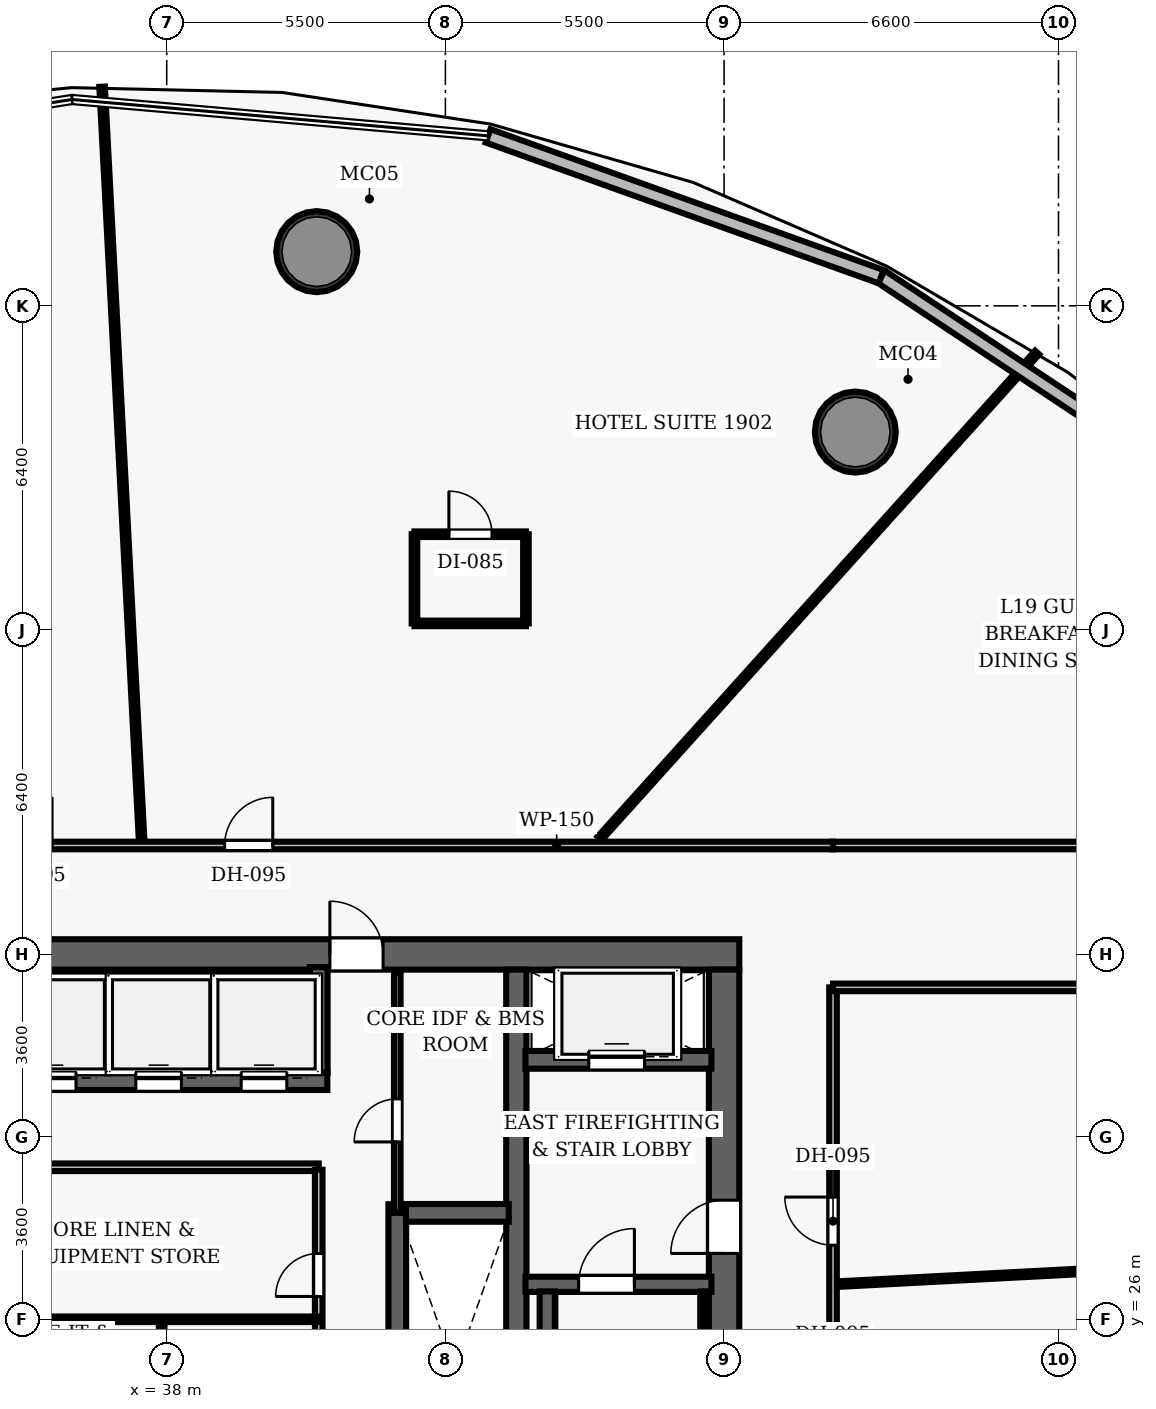
"""IFC4 building model, lengths in metres.
Left out: names, types, materials, properties, quantities, classifications, styles, units other than length and angle.
Written with IfcOpenShell. Run it as: python <this file> out.ifc"""

import sys

from ifc_helpers import new_model, si_unit, direction, frame, frame_2d, origin, origin_2d, place, context, subcontext, project, spatial, rectangle, hollow_circle, extrude, element, fill, save


model = new_model("IFC4")
c1 = context("Model", 3, precision=1e-05, world=origin(), true_north=direction((0.0, 1.0)))
c2 = subcontext(c1, "Body", "Model", "MODEL_VIEW")
j1 = project(units=[si_unit("LENGTHUNIT", "METRE"), si_unit("PLANEANGLEUNIT", "RADIAN")], contexts=[c1])
p1 = place(None, origin())
s1 = spatial("IfcSite", under=j1, at=p1, CompositionType="ELEMENT")
p2 = place(p1, origin())
s2 = spatial("IfcBuilding", under=s1, at=p2, CompositionType="ELEMENT")
p3 = place(p2, frame((0.0, 0.0, 83.4)))
s3 = spatial("IfcBuildingStorey", under=s2, at=p3, CompositionType="ELEMENT", Elevation=83.4)
p4 = place(p3, frame((26.7, 33.2, 0.0), z_axis=(0.0, 0.0, 1.0), x_axis=(1.0, 0.0, 0.0)))
e1 = element("IfcWall", 1, at=p4, inside=s3, PredefinedType="SHEAR", context=c2, shape_type="SweptSolid", body=[
    extrude(rectangle(XDim=22.6, YDim=0.6, at=frame_2d((11.3, 0.0))), origin(), (0.0, 0.0, 1.0), 3.5),
])
p5 = place(p4, frame((4.62, 0.0, 0.0)))
e2 = element("IfcOpeningElement", 2, at=p5, cuts=e1, PredefinedType="OPENING", context=c2, shape_type="SweptSolid", body=[
    extrude(rectangle(XDim=1.05, YDim=2.15, at=frame_2d((0.525, 1.075))), frame((0.0, 0.31, 0.0), z_axis=(0.0, -1.0, 0.0), x_axis=(1.0, 0.0, 0.0)), (0.0, 0.0, 1.0), 0.62),
])
p6 = place(p4, frame((14.52, 0.0, 0.0)))
e3 = element("IfcOpeningElement", 3, at=p6, cuts=e1, PredefinedType="OPENING", context=c2, shape_type="SweptSolid", body=[
    extrude(rectangle(XDim=1.05, YDim=2.15, at=frame_2d((0.525, 1.075))), frame((0.0, 0.31, 0.0), z_axis=(0.0, -1.0, 0.0), x_axis=(1.0, 0.0, 0.0)), (0.0, 0.0, 1.0), 0.62),
])
p7 = place(p3, frame((49.0, 19.1, 0.0), z_axis=(0.0, 0.0, 1.0), x_axis=(0.0, 1.0, 0.0)))
e4 = element("IfcWall", 4, at=p7, inside=s3, PredefinedType="SHEAR", context=c2, shape_type="SweptSolid", body=[
    extrude(rectangle(XDim=13.8, YDim=0.6, at=frame_2d((6.9, 0.0))), origin(), (0.0, 0.0, 1.0), 3.5),
])
p8 = place(p7, frame((8.2, 0.0, 0.0)))
e5 = element("IfcOpeningElement", 5, at=p8, cuts=e4, PredefinedType="OPENING", context=c2, shape_type="SweptSolid", body=[
    extrude(rectangle(XDim=1.05, YDim=2.15, at=frame_2d((0.525, 1.075))), frame((0.0, 0.31, 0.0), z_axis=(0.0, -1.0, 0.0), x_axis=(1.0, 0.0, 0.0)), (0.0, 0.0, 1.0), 0.62),
])
p9 = place(p3, frame((44.9, 19.1, 0.0), z_axis=(0.0, 0.0, 1.0), x_axis=(0.0, 1.0, 0.0)))
e6 = element("IfcWall", 6, at=p9, inside=s3, PredefinedType="SHEAR", context=c2, shape_type="SweptSolid", body=[
    extrude(rectangle(XDim=13.8, YDim=0.4, at=frame_2d((6.9, 0.0))), origin(), (0.0, 0.0, 1.0), 3.5),
])
for number, where, z_axis, x_axis in (
    (7, (51.59, 43.509, 0.0), (0.0, 0.0, 1.0), (1.0, 0.0, 0.0)),
    (8, (40.961, 47.069, 0.0), (0.0, 0.0, 1.0), (1.0, 0.0, 0.0)),
):
    element("IfcColumn", number, at=place(p3, frame(where, z_axis=z_axis, x_axis=x_axis)), inside=s3, PredefinedType="COLUMN", context=c2, shape_type="SweptSolid", body=[
        extrude(hollow_circle(Radius=0.8, WallThickness=0.06, at=origin_2d()), origin(), (0.0, 0.0, 1.0), 3.5),
    ])
p10 = place(p3, frame((45.08, 26.69, 0.0), z_axis=(0.0, 0.0, 1.0), x_axis=(1.0, 0.0, 0.0)))
e9 = element("IfcWall", 9, at=p10, inside=s3, PredefinedType="SHEAR", context=c2, shape_type="SweptSolid", body=[
    extrude(rectangle(XDim=3.67, YDim=0.3, at=frame_2d((1.835, 0.0))), origin(), (0.0, 0.0, 1.0), 3.5),
])
p11 = place(p10, frame((1.05, 0.0, 0.0)))
e10 = element("IfcOpeningElement", 10, at=p11, cuts=e9, PredefinedType="OPENING", context=c2, shape_type="SweptSolid", body=[
    extrude(rectangle(XDim=1.1, YDim=2.15, at=frame_2d((0.55, 1.075))), frame((0.0, 0.16, 0.0), z_axis=(0.0, -1.0, 0.0), x_axis=(1.0, 0.0, 0.0)), (0.0, 0.0, 1.0), 0.32),
])
p12 = place(p3, frame((45.51, 19.05, 0.0), z_axis=(0.0, 0.0, 1.0), x_axis=(0.0, 1.0, 0.0)))
e11 = element("IfcWall", 11, at=p12, inside=s3, PredefinedType="SHEAR", context=c2, shape_type="SweptSolid", body=[
    extrude(rectangle(XDim=7.5, YDim=0.3, at=frame_2d((3.75, 0.0))), origin(), (0.0, 0.0, 1.0), 3.5),
])
p13 = place(p3, frame((48.605, 19.1, 0.0), z_axis=(0.0, 0.0, 1.0), x_axis=(0.0, 1.0, 0.0)))
e12 = element("IfcWall", 12, at=p13, inside=s3, PredefinedType="SHEAR", context=c2, shape_type="SweptSolid", body=[
    extrude(rectangle(XDim=7.45, YDim=0.12, at=frame_2d((3.725, 0.0))), origin(), (0.0, 0.0, 1.0), 3.5),
])
p14 = place(p3, frame((45.08, 31.12, 0.0), z_axis=(0.0, 0.0, 1.0), x_axis=(1.0, 0.0, 0.0)))
e13 = element("IfcWall", 13, at=p14, inside=s3, PredefinedType="SHEAR", context=c2, shape_type="SweptSolid", body=[
    extrude(rectangle(XDim=3.67, YDim=0.35, at=frame_2d((1.835, 0.0))), origin(), (0.0, 0.0, 1.0), 2.6),
])
p15 = place(p14, frame((1.25, 0.0, 0.0)))
e14 = element("IfcOpeningElement", 14, at=p15, cuts=e13, PredefinedType="OPENING", context=c2, shape_type="SweptSolid", body=[
    extrude(rectangle(XDim=1.1, YDim=2.15, at=frame_2d((0.55, 1.075))), frame((0.0, 0.185, 0.0), z_axis=(0.0, -1.0, 0.0), x_axis=(1.0, 0.0, 0.0)), (0.0, 0.0, 1.0), 0.37),
])
p16 = place(p3, frame((42.55, 21.73, 0.0), z_axis=(0.0, 0.0, 1.0), x_axis=(0.0, 1.0, 0.0)))
e15 = element("IfcWall", 15, at=p16, inside=s3, PredefinedType="SHEAR", context=c2, shape_type="SweptSolid", body=[
    extrude(rectangle(XDim=6.54, YDim=0.35, at=frame_2d((3.27, 0.0))), origin(), (0.0, 0.0, 1.0), 2.6),
])
p17 = place(p3, frame((42.72, 28.1, 0.0), z_axis=(0.0, 0.0, 1.0), x_axis=(1.0, 0.0, 0.0)))
e16 = element("IfcWall", 16, at=p17, inside=s3, PredefinedType="SHEAR", context=c2, shape_type="SweptSolid", body=[
    extrude(rectangle(XDim=2.03, YDim=0.35, at=frame_2d((1.015, 0.0))), origin(), (0.0, 0.0, 1.0), 2.6),
])
p18 = place(p3, frame((34.81, 30.7, 0.0), z_axis=(0.0, 0.0, 1.0), x_axis=(1.0, 0.0, 0.0)))
e17 = element("IfcWall", 17, at=p18, inside=s3, PredefinedType="SHEAR", context=c2, shape_type="SweptSolid", body=[
    extrude(rectangle(XDim=6.36, YDim=0.35, at=frame_2d((3.18, 0.0))), origin(), (0.0, 0.0, 1.0), 2.6),
])
p19 = place(p18, frame((0.5, 0.0, 0.0)))
e18 = element("IfcOpeningElement", 18, at=p19, cuts=e17, PredefinedType="OPENING", context=c2, shape_type="SweptSolid", body=[
    extrude(rectangle(XDim=0.9, YDim=2.15, at=frame_2d((0.45, 1.075))), frame((0.0, 0.185, 0.0), z_axis=(0.0, -1.0, 0.0), x_axis=(1.0, 0.0, 0.0)), (0.0, 0.0, 1.0), 0.37),
])
p20 = place(p18, frame((2.58, 0.0, 0.0)))
e19 = element("IfcOpeningElement", 19, at=p20, cuts=e17, PredefinedType="OPENING", context=c2, shape_type="SweptSolid", body=[
    extrude(rectangle(XDim=0.9, YDim=2.15, at=frame_2d((0.45, 1.075))), frame((0.0, 0.185, 0.0), z_axis=(0.0, -1.0, 0.0), x_axis=(1.0, 0.0, 0.0)), (0.0, 0.0, 1.0), 0.37),
])
p21 = place(p18, frame((4.66, 0.0, 0.0)))
e20 = element("IfcOpeningElement", 20, at=p21, cuts=e17, PredefinedType="OPENING", context=c2, shape_type="SweptSolid", body=[
    extrude(rectangle(XDim=0.9, YDim=2.15, at=frame_2d((0.45, 1.075))), frame((0.0, 0.185, 0.0), z_axis=(0.0, -1.0, 0.0), x_axis=(1.0, 0.0, 0.0)), (0.0, 0.0, 1.0), 0.37),
])
p22 = place(p3, frame((41.0, 30.87, 0.0), z_axis=(0.0, 0.0, 1.0), x_axis=(0.0, 1.0, 0.0)))
e21 = element("IfcWall", 21, at=p22, inside=s3, PredefinedType="SHEAR", context=c2, shape_type="SweptSolid", body=[
    extrude(rectangle(XDim=2.08, YDim=0.35, at=frame_2d((1.04, 0.0))), origin(), (0.0, 0.0, 1.0), 2.6),
])
p23 = place(p3, frame((34.75, 29.0, 0.0), z_axis=(0.0, 0.0, 1.0), x_axis=(1.0, 0.0, 0.0)))
e22 = element("IfcWall", 22, at=p23, inside=s3, PredefinedType="PARTITIONING", context=c2, shape_type="SweptSolid", body=[
    extrude(rectangle(XDim=6.25, YDim=0.15, at=frame_2d((3.125, 0.0))), origin(), (0.0, 0.0, 1.0), 2.6),
])
p24 = place(p3, frame((41.0, 23.05, 0.0), z_axis=(0.0, 0.0, 1.0), x_axis=(0.0, 1.0, 0.0)))
e23 = element("IfcWall", 23, at=p24, inside=s3, PredefinedType="PARTITIONING", context=c2, shape_type="SweptSolid", body=[
    extrude(rectangle(XDim=5.9, YDim=0.15, at=frame_2d((2.95, 0.0))), origin(), (0.0, 0.0, 1.0), 2.6),
])
p25 = place(p24, frame((3.4, 0.0, 0.0)))
e24 = element("IfcOpeningElement", 24, at=p25, cuts=e23, PredefinedType="OPENING", context=c2, shape_type="SweptSolid", body=[
    extrude(rectangle(XDim=0.85, YDim=2.1, at=frame_2d((0.425, 1.05))), frame((0.0, 0.085, 0.0), z_axis=(0.0, -1.0, 0.0), x_axis=(1.0, 0.0, 0.0)), (0.0, 0.0, 1.0), 0.17),
])
p26 = place(p24, frame((0.45, 0.0, 0.0)))
e25 = element("IfcOpeningElement", 25, at=p26, cuts=e23, PredefinedType="OPENING", context=c2, shape_type="SweptSolid", body=[
    extrude(rectangle(XDim=0.85, YDim=2.1, at=frame_2d((0.425, 1.05))), frame((0.0, 0.085, 0.0), z_axis=(0.0, -1.0, 0.0), x_axis=(1.0, 0.0, 0.0)), (0.0, 0.0, 1.0), 0.17),
])
p27 = place(p3, frame((34.75, 26.0, 0.0), z_axis=(0.0, 0.0, 1.0), x_axis=(1.0, 0.0, 0.0)))
e26 = element("IfcWall", 26, at=p27, inside=s3, PredefinedType="PARTITIONING", context=c2, shape_type="SweptSolid", body=[
    extrude(rectangle(XDim=6.25, YDim=0.11, at=frame_2d((3.125, 0.0))), origin(), (0.0, 0.0, 1.0), 2.6),
])
p28 = place(p3, frame((37.9, 23.05, 0.0), z_axis=(0.0, 0.0, 1.0), x_axis=(0.0, 1.0, 0.0)))
e27 = element("IfcWall", 27, at=p28, inside=s3, PredefinedType="PARTITIONING", context=c2, shape_type="SweptSolid", body=[
    extrude(rectangle(XDim=2.95, YDim=0.11, at=frame_2d((1.475, 0.0))), origin(), (0.0, 0.0, 1.0), 2.6),
])
p29 = place(p28, frame((0.35, 0.0, 0.0)))
e28 = element("IfcOpeningElement", 28, at=p29, cuts=e27, PredefinedType="OPENING", context=c2, shape_type="SweptSolid", body=[
    extrude(rectangle(XDim=0.85, YDim=2.1, at=frame_2d((0.425, 1.05))), frame((0.0, 0.065, 0.0), z_axis=(0.0, -1.0, 0.0), x_axis=(1.0, 0.0, 0.0)), (0.0, 0.0, 1.0), 0.13),
])
p30 = place(p3, frame((42.55, 28.1, 0.0), z_axis=(0.0, 0.0, 1.0), x_axis=(0.0, 1.0, 0.0)))
e29 = element("IfcWall", 29, at=p30, inside=s3, PredefinedType="PARTITIONING", context=c2, shape_type="SweptSolid", body=[
    extrude(rectangle(XDim=4.75, YDim=0.13, at=frame_2d((2.375, 0.0))), origin(), (0.0, 0.0, 1.0), 2.6),
])
p31 = place(p30, frame((1.4, 0.0, 0.0)))
e30 = element("IfcOpeningElement", 30, at=p31, cuts=e29, PredefinedType="OPENING", context=c2, shape_type="SweptSolid", body=[
    extrude(rectangle(XDim=0.85, YDim=2.1, at=frame_2d((0.425, 1.05))), frame((0.0, 0.075, 0.0), z_axis=(0.0, -1.0, 0.0), x_axis=(1.0, 0.0, 0.0)), (0.0, 0.0, 1.0), 0.15),
])
p32 = place(p3, frame((27.65, 35.35, 0.0), z_axis=(0.0, 0.0, 1.0), x_axis=(1.0, 0.0, 0.0)))
e31 = element("IfcWall", 31, at=p32, inside=s3, PredefinedType="PARTITIONING", context=c2, shape_type="SweptSolid", body=[
    extrude(rectangle(XDim=23.5, YDim=0.15, at=frame_2d((11.75, 0.0))), origin(), (0.0, 0.0, 1.0), 2.6),
])
p33 = place(p32, frame((11.493, 0.0, 0.0)))
e32 = element("IfcOpeningElement", 32, at=p33, cuts=e31, PredefinedType="OPENING", context=c2, shape_type="SweptSolid", body=[
    extrude(rectangle(XDim=0.95, YDim=2.15, at=frame_2d((0.475, 1.075))), frame((0.0, 0.085, 0.0), z_axis=(0.0, -1.0, 0.0), x_axis=(1.0, 0.0, 0.0)), (0.0, 0.0, 1.0), 0.17),
])
p34 = place(p32, frame((7.137, 0.0, 0.0)))
e33 = element("IfcOpeningElement", 33, at=p34, cuts=e31, PredefinedType="OPENING", context=c2, shape_type="SweptSolid", body=[
    extrude(rectangle(XDim=0.95, YDim=2.15, at=frame_2d((0.475, 1.075))), frame((0.0, 0.085, 0.0), z_axis=(0.0, -1.0, 0.0), x_axis=(1.0, 0.0, 0.0)), (0.0, 0.0, 1.0), 0.17),
])
p35 = place(p3, frame((51.15, 16.65, 0.0), z_axis=(0.0, 0.0, 1.0), x_axis=(0.0, 1.0, 0.0)))
e34 = element("IfcWall", 34, at=p35, inside=s3, PredefinedType="PARTITIONING", context=c2, shape_type="SweptSolid", body=[
    extrude(rectangle(XDim=15.9, YDim=0.15, at=frame_2d((7.95, 0.0))), origin(), (0.0, 0.0, 1.0), 2.6),
])
p36 = place(p35, frame((10.812, 0.0, 0.0)))
e35 = element("IfcOpeningElement", 35, at=p36, cuts=e34, PredefinedType="OPENING", context=c2, shape_type="SweptSolid", body=[
    extrude(rectangle(XDim=0.95, YDim=2.15, at=frame_2d((0.475, 1.075))), frame((0.0, 0.085, 0.0), z_axis=(0.0, -1.0, 0.0), x_axis=(1.0, 0.0, 0.0)), (0.0, 0.0, 1.0), 0.17),
])
p37 = place(p35, frame((7.281, 0.0, 0.0)))
e36 = element("IfcOpeningElement", 36, at=p37, cuts=e34, PredefinedType="OPENING", context=c2, shape_type="SweptSolid", body=[
    extrude(rectangle(XDim=0.95, YDim=2.15, at=frame_2d((0.475, 1.075))), frame((0.0, 0.085, 0.0), z_axis=(0.0, -1.0, 0.0), x_axis=(1.0, 0.0, 0.0)), (0.0, 0.0, 1.0), 0.17),
])
for number, where, z_axis, x_axis in (
    (37, (51.15, 35.35, 0.0), (0.0, 0.0, 1.0), (1.0, 0.0, 0.0)),
    (38, (51.15, 32.55, 0.0), (0.0, 0.0, 1.0), (1.0, 0.0, 0.0)),
):
    element("IfcWall", number, at=place(p3, frame(where, z_axis=z_axis, x_axis=x_axis)), inside=s3, PredefinedType="PARTITIONING", context=c2, shape_type="SweptSolid", body=[
        extrude(rectangle(XDim=13.221, YDim=0.15, at=frame_2d((6.611, 0.0))), origin(), (0.0, 0.0, 1.0), 2.6),
    ])
p38 = place(p3, frame((51.29, 26.697, 0.0), z_axis=(0.0, 0.0, 1.0), x_axis=(0.998629785632, 0.052331169003, 0.0)))
e39 = element("IfcWall", 39, at=p38, inside=s3, PredefinedType="PARTITIONING", context=c2, shape_type="SweptSolid", body=[
    extrude(rectangle(XDim=18.293, YDim=0.11, at=frame_2d((9.146, 0.0))), origin(), (0.0, 0.0, 1.0), 2.6),
])
p39 = place(p3, frame((46.545, 35.49, 0.0), z_axis=(0.0, 0.0, 1.0), x_axis=(0.669127792896, 0.743147358721, 0.0)))
e40 = element("IfcWall", 40, at=p39, inside=s3, PredefinedType="PARTITIONING", context=c2, shape_type="SweptSolid", body=[
    extrude(rectangle(XDim=12.903, YDim=0.11, at=frame_2d((6.452, 0.0))), origin(), (0.0, 0.0, 1.0), 2.6),
])
p40 = place(p3, frame((37.503, 35.49, 0.0), z_axis=(0.0, 0.0, 1.0), x_axis=(-0.052346625091, 0.998628975567, 0.0)))
e41 = element("IfcWall", 41, at=p40, inside=s3, PredefinedType="PARTITIONING", context=c2, shape_type="SweptSolid", body=[
    extrude(rectangle(XDim=14.854, YDim=0.11, at=frame_2d((7.427, 0.0))), origin(), (0.0, 0.0, 1.0), 2.6),
])
p41 = place(p3, frame((42.889, 39.733, 0.0), z_axis=(0.0, 0.0, 1.0), x_axis=(1.0, 0.0, 0.0)))
e42 = element("IfcWall", 42, at=p41, inside=s3, PredefinedType="PARTITIONING", context=c2, shape_type="SweptSolid", body=[
    extrude(rectangle(XDim=2.2, YDim=0.11, at=frame_2d((1.1, 0.0))), origin(), (0.0, 0.0, 1.0), 2.6),
])
p42 = place(p3, frame((42.889, 41.493, 0.0), z_axis=(0.0, 0.0, 1.0), x_axis=(1.0, 0.0, 0.0)))
e43 = element("IfcWall", 43, at=p42, inside=s3, PredefinedType="PARTITIONING", context=c2, shape_type="SweptSolid", body=[
    extrude(rectangle(XDim=2.2, YDim=0.11, at=frame_2d((1.1, 0.0))), origin(), (0.0, 0.0, 1.0), 2.6),
])
p43 = place(p42, frame((0.68, 0.0, 0.0)))
e44 = element("IfcOpeningElement", 44, at=p43, cuts=e43, PredefinedType="OPENING", context=c2, shape_type="SweptSolid", body=[
    extrude(rectangle(XDim=0.85, YDim=2.1, at=frame_2d((0.425, 1.05))), frame((0.0, 0.065, 0.0), z_axis=(0.0, -1.0, 0.0), x_axis=(1.0, 0.0, 0.0)), (0.0, 0.0, 1.0), 0.13),
])
for number, where, z_axis, x_axis in (
    (45, (42.889, 39.733, 0.0), (0.0, 0.0, 1.0), (0.0, 1.0, 0.0)),
    (46, (45.089, 39.733, 0.0), (0.0, 0.0, 1.0), (0.0, 1.0, 0.0)),
):
    element("IfcWall", number, at=place(p3, frame(where, z_axis=z_axis, x_axis=x_axis)), inside=s3, PredefinedType="PARTITIONING", context=c2, shape_type="SweptSolid", body=[
        extrude(rectangle(XDim=1.76, YDim=0.11, at=frame_2d((0.88, 0.0))), origin(), (0.0, 0.0, 1.0), 2.6),
    ])
p44 = place(p3, frame((52.101, 46.575, 0.0), z_axis=(0.0, 0.0, 1.0), x_axis=(0.833156470186, -0.553037337064, 0.0)))
e47 = element("IfcWall", 47, at=p44, inside=s3, PredefinedType="SOLIDWALL", context=c2, shape_type="SweptSolid", body=[
    extrude(rectangle(XDim=8.171, YDim=0.28, at=frame_2d((4.085, 0.0))), origin(), (0.0, 0.0, 1.0), 3.25),
])
p45 = place(p3, frame((44.342, 49.354, 0.0), z_axis=(0.0, 0.0, 1.0), x_axis=(0.941431874185, -0.337203241782, 0.0)))
e48 = element("IfcWall", 48, at=p45, inside=s3, PredefinedType="SOLIDWALL", context=c2, shape_type="SweptSolid", body=[
    extrude(rectangle(XDim=8.241, YDim=0.28, at=frame_2d((4.121, 0.0))), origin(), (0.0, 0.0, 1.0), 3.25),
])
p46 = place(p11, origin())
e49 = element("IfcDoor", 49, at=p46, inside=s3, OperationType="SINGLE_SWING_RIGHT", PredefinedType="DOOR", context=c2, shape_type="SweptSolid", body=[
    extrude(rectangle(XDim=1.1, YDim=2.15, at=frame_2d((0.55, 1.075))), frame((0.0, 0.025, 0.0), z_axis=(0.0, -1.0, 0.0), x_axis=(1.0, 0.0, 0.0)), (0.0, 0.0, 1.0), 0.05),
])
fill(e10, e49)
p47 = place(p8, origin())
e50 = element("IfcDoor", 50, at=p47, inside=s3, OperationType="SINGLE_SWING_LEFT", PredefinedType="DOOR", context=c2, shape_type="SweptSolid", body=[
    extrude(rectangle(XDim=1.05, YDim=2.15, at=frame_2d((0.525, 1.075))), frame((0.0, 0.025, 0.0), z_axis=(0.0, -1.0, 0.0), x_axis=(1.0, 0.0, 0.0)), (0.0, 0.0, 1.0), 0.05),
])
fill(e5, e50)
p48 = place(p6, origin())
e51 = element("IfcDoor", 51, at=p48, inside=s3, OperationType="SINGLE_SWING_LEFT", PredefinedType="DOOR", context=c2, shape_type="SweptSolid", body=[
    extrude(rectangle(XDim=1.05, YDim=2.15, at=frame_2d((0.525, 1.075))), frame((0.0, 0.025, 0.0), z_axis=(0.0, -1.0, 0.0), x_axis=(1.0, 0.0, 0.0)), (0.0, 0.0, 1.0), 0.05),
])
fill(e3, e51)
p49 = place(p25, origin())
e52 = element("IfcDoor", 52, at=p49, inside=s3, OperationType="SINGLE_SWING_LEFT", PredefinedType="DOOR", context=c2, shape_type="SweptSolid", body=[
    extrude(rectangle(XDim=0.85, YDim=2.1, at=frame_2d((0.425, 1.05))), frame((0.0, 0.025, 0.0), z_axis=(0.0, -1.0, 0.0), x_axis=(1.0, 0.0, 0.0)), (0.0, 0.0, 1.0), 0.05),
])
fill(e24, e52)
p50 = place(p31, origin())
e53 = element("IfcDoor", 53, at=p50, inside=s3, OperationType="SINGLE_SWING_LEFT", PredefinedType="DOOR", context=c2, shape_type="SweptSolid", body=[
    extrude(rectangle(XDim=0.85, YDim=2.1, at=frame_2d((0.425, 1.05))), frame((0.0, 0.025, 0.0), z_axis=(0.0, -1.0, 0.0), x_axis=(1.0, 0.0, 0.0)), (0.0, 0.0, 1.0), 0.05),
])
fill(e30, e53)
p51 = place(p36, origin())
e54 = element("IfcDoor", 54, at=p51, inside=s3, OperationType="SINGLE_SWING_RIGHT", PredefinedType="DOOR", context=c2, shape_type="SweptSolid", body=[
    extrude(rectangle(XDim=0.95, YDim=2.15, at=frame_2d((0.475, 1.075))), frame((0.0, 0.025, 0.0), z_axis=(0.0, -1.0, 0.0), x_axis=(1.0, 0.0, 0.0)), (0.0, 0.0, 1.0), 0.05),
])
fill(e35, e54)
p52 = place(p33, origin())
e55 = element("IfcDoor", 55, at=p52, inside=s3, OperationType="SINGLE_SWING_RIGHT", PredefinedType="DOOR", context=c2, shape_type="SweptSolid", body=[
    extrude(rectangle(XDim=0.95, YDim=2.15, at=frame_2d((0.475, 1.075))), frame((0.0, 0.025, 0.0), z_axis=(0.0, -1.0, 0.0), x_axis=(1.0, 0.0, 0.0)), (0.0, 0.0, 1.0), 0.05),
])
fill(e32, e55)
p53 = place(p43, origin())
e56 = element("IfcDoor", 56, at=p53, inside=s3, OperationType="SINGLE_SWING_LEFT", PredefinedType="DOOR", context=c2, shape_type="SweptSolid", body=[
    extrude(rectangle(XDim=0.85, YDim=2.1, at=frame_2d((0.425, 1.05))), frame((0.0, 0.025, 0.0), z_axis=(0.0, -1.0, 0.0), x_axis=(1.0, 0.0, 0.0)), (0.0, 0.0, 1.0), 0.05),
])
fill(e44, e56)
p54 = place(p19, origin())
e57 = element("IfcDoor", 57, at=p54, inside=s3, OperationType="SLIDING_TO_LEFT", PredefinedType="DOOR", context=c2, shape_type="SweptSolid", body=[
    extrude(rectangle(XDim=0.9, YDim=2.15, at=frame_2d((0.45, 1.075))), frame((0.0, 0.025, 0.0), z_axis=(0.0, -1.0, 0.0), x_axis=(1.0, 0.0, 0.0)), (0.0, 0.0, 1.0), 0.05),
])
fill(e18, e57)
p55 = place(p20, origin())
e58 = element("IfcDoor", 58, at=p55, inside=s3, OperationType="SLIDING_TO_LEFT", PredefinedType="DOOR", context=c2, shape_type="SweptSolid", body=[
    extrude(rectangle(XDim=0.9, YDim=2.15, at=frame_2d((0.45, 1.075))), frame((0.0, 0.025, 0.0), z_axis=(0.0, -1.0, 0.0), x_axis=(1.0, 0.0, 0.0)), (0.0, 0.0, 1.0), 0.05),
])
fill(e19, e58)
p56 = place(p21, origin())
e59 = element("IfcDoor", 59, at=p56, inside=s3, OperationType="SLIDING_TO_LEFT", PredefinedType="DOOR", context=c2, shape_type="SweptSolid", body=[
    extrude(rectangle(XDim=0.9, YDim=2.15, at=frame_2d((0.45, 1.075))), frame((0.0, 0.025, 0.0), z_axis=(0.0, -1.0, 0.0), x_axis=(1.0, 0.0, 0.0)), (0.0, 0.0, 1.0), 0.05),
])
fill(e20, e59)
p57 = place(p15, origin())
e60 = element("IfcDoor", 60, at=p57, inside=s3, OperationType="SLIDING_TO_LEFT", PredefinedType="DOOR", context=c2, shape_type="SweptSolid", body=[
    extrude(rectangle(XDim=1.1, YDim=2.15, at=frame_2d((0.55, 1.075))), frame((0.0, 0.025, 0.0), z_axis=(0.0, -1.0, 0.0), x_axis=(1.0, 0.0, 0.0)), (0.0, 0.0, 1.0), 0.05),
])
fill(e14, e60)
save(model, sys.argv[1])
